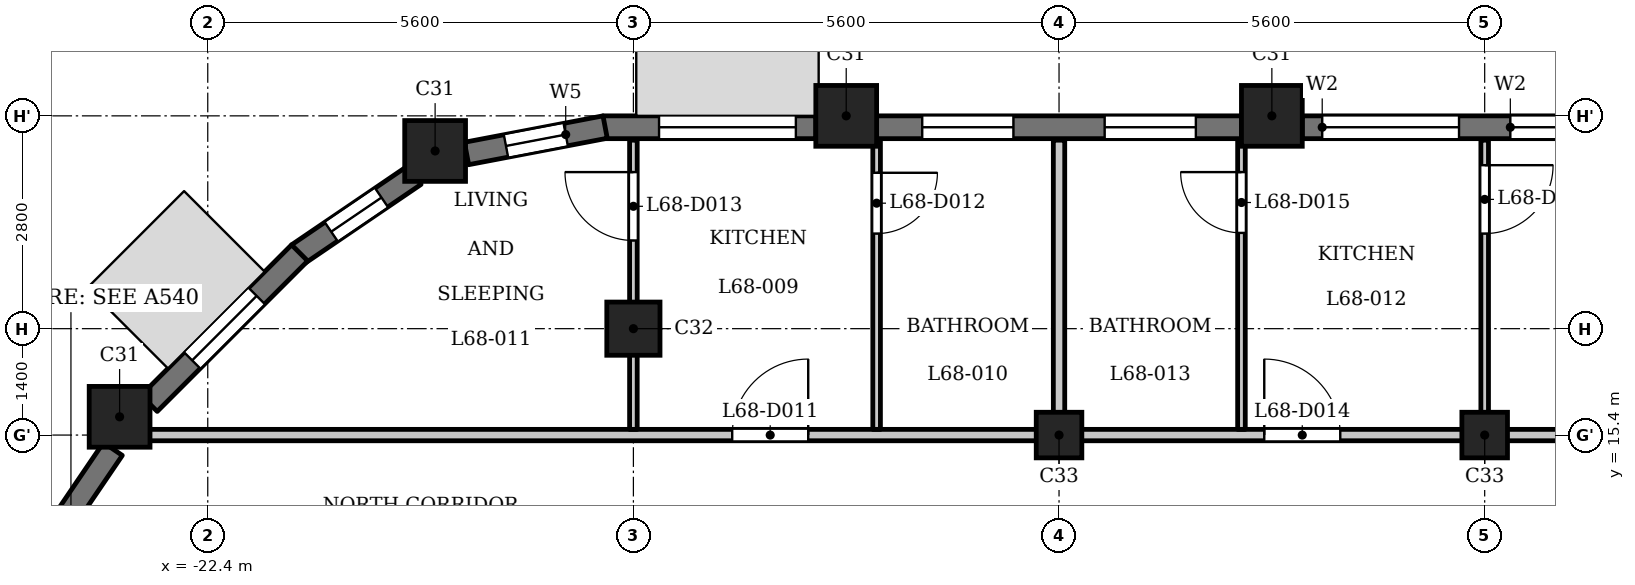
"""IFC4 building model, lengths in metres.
Left out: names, types, materials, properties, quantities, classifications, styles, units other than length and angle.
Written with IfcOpenShell. Run it as: python <this file> out.ifc"""

import sys

from ifc_helpers import new_model, si_unit, direction, frame, frame_2d, origin, origin_2d, place, context, subcontext, project, spatial, rectangle, extrude, element, fill, save


model = new_model("IFC4")
c1 = context("Model", 3, precision=1e-05, world=origin(), true_north=direction((0.0, 1.0)))
c2 = subcontext(c1, "Body", "Model", "MODEL_VIEW")
j1 = project(units=[si_unit("LENGTHUNIT", "METRE"), si_unit("PLANEANGLEUNIT", "RADIAN")], contexts=[c1])
p1 = place(None, origin())
s1 = spatial("IfcSite", under=j1, at=p1, CompositionType="ELEMENT")
p2 = place(p1, origin())
s2 = spatial("IfcBuilding", under=s1, at=p2, CompositionType="ELEMENT")
p3 = place(p2, frame((0.0, 0.0, 262.7)))
s3 = spatial("IfcBuildingStorey", under=s2, at=p3, CompositionType="ELEMENT", Elevation=262.7)
for number, where, z_axis, x_axis in (
    (1, (-8.4, 19.6, 0.0), (0.0, 0.0, 1.0), (1.0, 0.0, 0.0)),
    (2, (-14.0, 19.6, 0.0), (0.0, 0.0, 1.0), (1.0, 0.0, 0.0)),
    (3, (-19.409, 19.138, 0.0), (0.0, 0.0, 1.0), (1.0, 0.0, 0.0)),
    (4, (-23.56, 15.64, 0.0), (0.0, 0.0, 1.0), (1.0, 0.0, 0.0)),
):
    element("IfcColumn", number, at=place(p3, frame(where, z_axis=z_axis, x_axis=x_axis)), inside=s3, PredefinedType="COLUMN", context=c2, shape_type="SweptSolid", body=[
        extrude(rectangle(XDim=0.8, YDim=0.8, at=origin_2d()), origin(), (0.0, 0.0, 1.0), 3.5),
    ])
p4 = place(p3, frame((-16.8, 16.8, 0.0), z_axis=(0.0, 0.0, 1.0), x_axis=(1.0, 0.0, 0.0)))
e5 = element("IfcColumn", 5, at=p4, inside=s3, PredefinedType="COLUMN", context=c2, shape_type="SweptSolid", body=[
    extrude(rectangle(XDim=0.7, YDim=0.7, at=origin_2d()), origin(), (0.0, 0.0, 1.0), 3.5),
])
for number, where, z_axis, x_axis in (
    (6, (-11.2, 15.4, 0.0), (0.0, 0.0, 1.0), (1.0, 0.0, 0.0)),
    (7, (-5.6, 15.4, 0.0), (0.0, 0.0, 1.0), (1.0, 0.0, 0.0)),
):
    element("IfcColumn", number, at=place(p3, frame(where, z_axis=z_axis, x_axis=x_axis)), inside=s3, PredefinedType="COLUMN", context=c2, shape_type="SweptSolid", body=[
        extrude(rectangle(XDim=0.6, YDim=0.6, at=origin_2d()), origin(), (0.0, 0.0, 1.0), 3.5),
    ])
p5 = place(p3, frame((-3.2, 19.45, 0.0), z_axis=(0.0, 0.0, 1.0), x_axis=(-1.0, 0.0, 0.0)))
e8 = element("IfcWall", 8, at=p5, inside=s3, PredefinedType="SOLIDWALL", context=c2, shape_type="SweptSolid", body=[
    extrude(rectangle(XDim=4.8, YDim=0.3, at=frame_2d((2.4, 0.0))), origin(), (0.0, 0.0, 1.0), 2.55),
])
p6 = place(p5, frame((0.262, 0.0, 0.9)))
e9 = element("IfcOpeningElement", 9, at=p6, cuts=e8, PredefinedType="OPENING", context=c2, shape_type="SweptSolid", body=[
    extrude(rectangle(XDim=1.8, YDim=1.25, at=frame_2d((0.9, 0.625))), frame((0.0, 0.16, 0.0), z_axis=(0.0, -1.0, 0.0), x_axis=(1.0, 0.0, 0.0)), (0.0, 0.0, 1.0), 0.32),
])
p7 = place(p5, frame((2.738, 0.0, 0.9)))
e10 = element("IfcOpeningElement", 10, at=p7, cuts=e8, PredefinedType="OPENING", context=c2, shape_type="SweptSolid", body=[
    extrude(rectangle(XDim=1.8, YDim=1.25, at=frame_2d((0.9, 0.625))), frame((0.0, 0.16, 0.0), z_axis=(0.0, -1.0, 0.0), x_axis=(1.0, 0.0, 0.0)), (0.0, 0.0, 1.0), 0.32),
])
p8 = place(p3, frame((-8.8, 19.45, 0.0), z_axis=(0.0, 0.0, 1.0), x_axis=(-1.0, 0.0, 0.0)))
e11 = element("IfcWall", 11, at=p8, inside=s3, PredefinedType="SOLIDWALL", context=c2, shape_type="SweptSolid", body=[
    extrude(rectangle(XDim=4.8, YDim=0.3, at=frame_2d((2.4, 0.0))), origin(), (0.0, 0.0, 1.0), 2.55),
])
p9 = place(p8, frame((0.6, 0.0, 0.6)))
e12 = element("IfcOpeningElement", 12, at=p9, cuts=e11, PredefinedType="OPENING", context=c2, shape_type="SweptSolid", body=[
    extrude(rectangle(XDim=1.2, YDim=1.55, at=frame_2d((0.6, 0.775))), frame((0.0, 0.16, 0.0), z_axis=(0.0, -1.0, 0.0), x_axis=(1.0, 0.0, 0.0)), (0.0, 0.0, 1.0), 0.32),
])
p10 = place(p8, frame((3.0, 0.0, 0.6)))
e13 = element("IfcOpeningElement", 13, at=p10, cuts=e11, PredefinedType="OPENING", context=c2, shape_type="SweptSolid", body=[
    extrude(rectangle(XDim=1.2, YDim=1.55, at=frame_2d((0.6, 0.775))), frame((0.0, 0.16, 0.0), z_axis=(0.0, -1.0, 0.0), x_axis=(1.0, 0.0, 0.0)), (0.0, 0.0, 1.0), 0.32),
])
p11 = place(p3, frame((-14.4, 19.45, 0.0), z_axis=(0.0, 0.0, 1.0), x_axis=(-1.0, 0.0, 0.0)))
e14 = element("IfcWall", 14, at=p11, inside=s3, PredefinedType="SOLIDWALL", context=c2, shape_type="SweptSolid", body=[
    extrude(rectangle(XDim=2.8, YDim=0.3, at=frame_2d((1.4, 0.0))), origin(), (0.0, 0.0, 1.0), 2.55),
])
p12 = place(p11, frame((0.262, 0.0, 0.9)))
e15 = element("IfcOpeningElement", 15, at=p12, cuts=e14, PredefinedType="OPENING", context=c2, shape_type="SweptSolid", body=[
    extrude(rectangle(XDim=1.8, YDim=1.25, at=frame_2d((0.9, 0.625))), frame((0.0, 0.16, 0.0), z_axis=(0.0, -1.0, 0.0), x_axis=(1.0, 0.0, 0.0)), (0.0, 0.0, 1.0), 0.32),
])
p13 = place(p3, frame((-17.172, 19.453, 0.0), z_axis=(0.0, 0.0, 1.0), x_axis=(-0.982301706131, -0.187305520826, 0.0)))
e16 = element("IfcWall", 16, at=p13, inside=s3, PredefinedType="SOLIDWALL", context=c2, shape_type="SweptSolid", body=[
    extrude(rectangle(XDim=1.856, YDim=0.3, at=frame_2d((0.928, 0.0))), origin(), (0.0, 0.0, 1.0), 2.55),
])
p14 = place(p13, frame((0.528, 0.0, 0.6)))
e17 = element("IfcOpeningElement", 17, at=p14, cuts=e16, PredefinedType="OPENING", context=c2, shape_type="SweptSolid", body=[
    extrude(rectangle(XDim=0.8, YDim=1.55, at=frame_2d((0.4, 0.775))), frame((0.0, 0.16, 0.0), z_axis=(0.0, -1.0, 0.0), x_axis=(1.0, 0.0, 0.0)), (0.0, 0.0, 1.0), 0.32),
])
p15 = place(p3, frame((-19.678, 18.822, 0.0), z_axis=(0.0, 0.0, 1.0), x_axis=(-0.826997446962, -0.562205676526, 0.0)))
e18 = element("IfcWall", 18, at=p15, inside=s3, PredefinedType="SOLIDWALL", context=c2, shape_type="SweptSolid", body=[
    extrude(rectangle(XDim=1.856, YDim=0.3, at=frame_2d((0.928, 0.0))), origin(), (0.0, 0.0, 1.0), 2.55),
])
p16 = place(p15, frame((0.528, 0.0, 0.6)))
e19 = element("IfcOpeningElement", 19, at=p16, cuts=e18, PredefinedType="OPENING", context=c2, shape_type="SweptSolid", body=[
    extrude(rectangle(XDim=0.8, YDim=1.55, at=frame_2d((0.4, 0.775))), frame((0.0, 0.16, 0.0), z_axis=(0.0, -1.0, 0.0), x_axis=(1.0, 0.0, 0.0)), (0.0, 0.0, 1.0), 0.32),
])
p17 = place(p3, frame((-21.191, 17.797, 0.0), z_axis=(0.0, 0.0, 1.0), x_axis=(-0.707106781187, -0.707106781187, 0.0)))
e20 = element("IfcWall", 20, at=p17, inside=s3, PredefinedType="SOLIDWALL", context=c2, shape_type="SweptSolid", body=[
    extrude(rectangle(XDim=2.8, YDim=0.3, at=frame_2d((1.4, 0.0))), origin(), (0.0, 0.0, 1.0), 2.55),
])
p18 = place(p17, frame((0.8, 0.0, 0.6)))
e21 = element("IfcOpeningElement", 21, at=p18, cuts=e20, PredefinedType="OPENING", context=c2, shape_type="SweptSolid", body=[
    extrude(rectangle(XDim=1.2, YDim=1.55, at=frame_2d((0.6, 0.775))), frame((0.0, 0.16, 0.0), z_axis=(0.0, -1.0, 0.0), x_axis=(1.0, 0.0, 0.0)), (0.0, 0.0, 1.0), 0.32),
])
p19 = place(p3, frame((-23.648, 15.217, 0.0), z_axis=(0.0, 0.0, 1.0), x_axis=(-0.562043265151, -0.827107833416, 0.0)))
e22 = element("IfcWall", 22, at=p19, inside=s3, PredefinedType="SOLIDWALL", context=c2, shape_type="SweptSolid", body=[
    extrude(rectangle(XDim=1.377, YDim=0.3, at=frame_2d((0.688, 0.0))), origin(), (0.0, 0.0, 1.0), 2.55),
])
p20 = place(p3, frame((-23.55, 15.4, 0.0), z_axis=(0.0, 0.0, 1.0), x_axis=(1.0, 0.0, 0.0)))
e23 = element("IfcWall", 23, at=p20, inside=s3, PredefinedType="PARTITIONING", context=c2, shape_type="SweptSolid", body=[
    extrude(rectangle(XDim=46.872, YDim=0.15, at=frame_2d((23.436, 0.0))), origin(), (0.0, 0.0, 1.0), 3.2),
])
p21 = place(p20, frame((8.05, 0.0, 0.0)))
e24 = element("IfcOpeningElement", 24, at=p21, cuts=e23, PredefinedType="OPENING", context=c2, shape_type="SweptSolid", body=[
    extrude(rectangle(XDim=1.0, YDim=2.1, at=frame_2d((0.5, 1.05))), frame((0.0, 0.085, 0.0), z_axis=(0.0, -1.0, 0.0), x_axis=(1.0, 0.0, 0.0)), (0.0, 0.0, 1.0), 0.17),
])
p22 = place(p20, frame((15.05, 0.0, 0.0)))
e25 = element("IfcOpeningElement", 25, at=p22, cuts=e23, PredefinedType="OPENING", context=c2, shape_type="SweptSolid", body=[
    extrude(rectangle(XDim=1.0, YDim=2.1, at=frame_2d((0.5, 1.05))), frame((0.0, 0.085, 0.0), z_axis=(0.0, -1.0, 0.0), x_axis=(1.0, 0.0, 0.0)), (0.0, 0.0, 1.0), 0.17),
])
p23 = place(p20, frame((26.25, 0.0, 0.0)))
e26 = element("IfcOpeningElement", 26, at=p23, cuts=e23, PredefinedType="OPENING", context=c2, shape_type="SweptSolid", body=[
    extrude(rectangle(XDim=1.0, YDim=2.1, at=frame_2d((0.5, 1.05))), frame((0.0, 0.085, 0.0), z_axis=(0.0, -1.0, 0.0), x_axis=(1.0, 0.0, 0.0)), (0.0, 0.0, 1.0), 0.17),
])
p24 = place(p20, frame((38.2, 0.0, 0.0)))
e27 = element("IfcOpeningElement", 27, at=p24, cuts=e23, PredefinedType="OPENING", context=c2, shape_type="SweptSolid", body=[
    extrude(rectangle(XDim=1.0, YDim=2.1, at=frame_2d((0.5, 1.05))), frame((0.0, 0.085, 0.0), z_axis=(0.0, -1.0, 0.0), x_axis=(1.0, 0.0, 0.0)), (0.0, 0.0, 1.0), 0.17),
])
p25 = place(p3, frame((-16.8, 15.475, 0.0), z_axis=(0.0, 0.0, 1.0), x_axis=(0.0, 1.0, 0.0)))
e28 = element("IfcWall", 28, at=p25, inside=s3, PredefinedType="PARTITIONING", context=c2, shape_type="SweptSolid", body=[
    extrude(rectangle(XDim=3.805, YDim=0.1, at=frame_2d((1.902, 0.0))), origin(), (0.0, 0.0, 1.0), 3.2),
])
p26 = place(p25, frame((2.485, 0.0, 0.0)))
e29 = element("IfcOpeningElement", 29, at=p26, cuts=e28, PredefinedType="OPENING", context=c2, shape_type="SweptSolid", body=[
    extrude(rectangle(XDim=0.9, YDim=2.1, at=frame_2d((0.45, 1.05))), frame((0.0, 0.06, 0.0), z_axis=(0.0, -1.0, 0.0), x_axis=(1.0, 0.0, 0.0)), (0.0, 0.0, 1.0), 0.12),
])
p27 = place(p3, frame((-13.6, 15.475, 0.0), z_axis=(0.0, 0.0, 1.0), x_axis=(0.0, 1.0, 0.0)))
e30 = element("IfcWall", 30, at=p27, inside=s3, PredefinedType="PARTITIONING", context=c2, shape_type="SweptSolid", body=[
    extrude(rectangle(XDim=3.805, YDim=0.1, at=frame_2d((1.902, 0.0))), origin(), (0.0, 0.0, 1.0), 3.2),
])
p28 = place(p27, frame((2.576, 0.0, 0.0)))
e31 = element("IfcOpeningElement", 31, at=p28, cuts=e30, PredefinedType="OPENING", context=c2, shape_type="SweptSolid", body=[
    extrude(rectangle(XDim=0.8, YDim=2.1, at=frame_2d((0.4, 1.05))), frame((0.0, 0.06, 0.0), z_axis=(0.0, -1.0, 0.0), x_axis=(1.0, 0.0, 0.0)), (0.0, 0.0, 1.0), 0.12),
])
p29 = place(p3, frame((-11.2, 15.475, 0.0), z_axis=(0.0, 0.0, 1.0), x_axis=(0.0, 1.0, 0.0)))
e32 = element("IfcWall", 32, at=p29, inside=s3, PredefinedType="PARTITIONING", context=c2, shape_type="SweptSolid", body=[
    extrude(rectangle(XDim=3.805, YDim=0.15, at=frame_2d((1.902, 0.0))), origin(), (0.0, 0.0, 1.0), 3.2),
])
p30 = place(p3, frame((-8.8, 15.475, 0.0), z_axis=(0.0, 0.0, 1.0), x_axis=(0.0, 1.0, 0.0)))
e33 = element("IfcWall", 33, at=p30, inside=s3, PredefinedType="PARTITIONING", context=c2, shape_type="SweptSolid", body=[
    extrude(rectangle(XDim=3.805, YDim=0.1, at=frame_2d((1.902, 0.0))), origin(), (0.0, 0.0, 1.0), 3.2),
])
p31 = place(p30, frame((2.585, 0.0, 0.0)))
e34 = element("IfcOpeningElement", 34, at=p31, cuts=e33, PredefinedType="OPENING", context=c2, shape_type="SweptSolid", body=[
    extrude(rectangle(XDim=0.8, YDim=2.1, at=frame_2d((0.4, 1.05))), frame((0.0, 0.06, 0.0), z_axis=(0.0, -1.0, 0.0), x_axis=(1.0, 0.0, 0.0)), (0.0, 0.0, 1.0), 0.12),
])
p32 = place(p3, frame((-5.6, 15.475, 0.0), z_axis=(0.0, 0.0, 1.0), x_axis=(0.0, 1.0, 0.0)))
e35 = element("IfcWall", 35, at=p32, inside=s3, PredefinedType="PARTITIONING", context=c2, shape_type="SweptSolid", body=[
    extrude(rectangle(XDim=3.805, YDim=0.1, at=frame_2d((1.902, 0.0))), origin(), (0.0, 0.0, 1.0), 3.2),
])
p33 = place(p32, frame((2.576, 0.0, 0.0)))
e36 = element("IfcOpeningElement", 36, at=p33, cuts=e35, PredefinedType="OPENING", context=c2, shape_type="SweptSolid", body=[
    extrude(rectangle(XDim=0.9, YDim=2.1, at=frame_2d((0.45, 1.05))), frame((0.0, 0.06, 0.0), z_axis=(0.0, -1.0, 0.0), x_axis=(1.0, 0.0, 0.0)), (0.0, 0.0, 1.0), 0.12),
])
p34 = place(p21, origin())
e37 = element("IfcDoor", 37, at=p34, inside=s3, OperationType="SINGLE_SWING_LEFT", PredefinedType="DOOR", context=c2, shape_type="SweptSolid", body=[
    extrude(rectangle(XDim=1.0, YDim=2.1, at=frame_2d((0.5, 1.05))), frame((0.0, 0.025, 0.0), z_axis=(0.0, -1.0, 0.0), x_axis=(1.0, 0.0, 0.0)), (0.0, 0.0, 1.0), 0.05),
])
fill(e24, e37)
p35 = place(p28, origin())
e38 = element("IfcDoor", 38, at=p35, inside=s3, OperationType="SINGLE_SWING_RIGHT", PredefinedType="DOOR", context=c2, shape_type="SweptSolid", body=[
    extrude(rectangle(XDim=0.8, YDim=2.1, at=frame_2d((0.4, 1.05))), frame((0.0, 0.025, 0.0), z_axis=(0.0, -1.0, 0.0), x_axis=(1.0, 0.0, 0.0)), (0.0, 0.0, 1.0), 0.05),
])
fill(e31, e38)
p36 = place(p26, origin())
e39 = element("IfcDoor", 39, at=p36, inside=s3, OperationType="SINGLE_SWING_LEFT", PredefinedType="DOOR", context=c2, shape_type="SweptSolid", body=[
    extrude(rectangle(XDim=0.9, YDim=2.1, at=frame_2d((0.45, 1.05))), frame((0.0, 0.025, 0.0), z_axis=(0.0, -1.0, 0.0), x_axis=(1.0, 0.0, 0.0)), (0.0, 0.0, 1.0), 0.05),
])
fill(e29, e39)
p37 = place(p22, origin())
e40 = element("IfcDoor", 40, at=p37, inside=s3, OperationType="SINGLE_SWING_RIGHT", PredefinedType="DOOR", context=c2, shape_type="SweptSolid", body=[
    extrude(rectangle(XDim=1.0, YDim=2.1, at=frame_2d((0.5, 1.05))), frame((0.0, 0.025, 0.0), z_axis=(0.0, -1.0, 0.0), x_axis=(1.0, 0.0, 0.0)), (0.0, 0.0, 1.0), 0.05),
])
fill(e25, e40)
p38 = place(p31, origin())
e41 = element("IfcDoor", 41, at=p38, inside=s3, OperationType="SINGLE_SWING_LEFT", PredefinedType="DOOR", context=c2, shape_type="SweptSolid", body=[
    extrude(rectangle(XDim=0.8, YDim=2.1, at=frame_2d((0.4, 1.05))), frame((0.0, 0.025, 0.0), z_axis=(0.0, -1.0, 0.0), x_axis=(1.0, 0.0, 0.0)), (0.0, 0.0, 1.0), 0.05),
])
fill(e34, e41)
p39 = place(p33, origin())
e42 = element("IfcDoor", 42, at=p39, inside=s3, OperationType="SINGLE_SWING_RIGHT", PredefinedType="DOOR", context=c2, shape_type="SweptSolid", body=[
    extrude(rectangle(XDim=0.9, YDim=2.1, at=frame_2d((0.45, 1.05))), frame((0.0, 0.025, 0.0), z_axis=(0.0, -1.0, 0.0), x_axis=(1.0, 0.0, 0.0)), (0.0, 0.0, 1.0), 0.05),
])
fill(e36, e42)
p40 = place(p6, origin())
e43 = element("IfcWindow", 43, at=p40, inside=s3, PartitioningType="SINGLE_PANEL", PredefinedType="WINDOW", context=c2, shape_type="SweptSolid", body=[
    extrude(rectangle(XDim=1.8, YDim=1.25, at=frame_2d((0.9, 0.625))), frame((0.0, 0.03, 0.0), z_axis=(0.0, -1.0, 0.0), x_axis=(1.0, 0.0, 0.0)), (0.0, 0.0, 1.0), 0.06),
])
fill(e9, e43)
p41 = place(p7, origin())
e44 = element("IfcWindow", 44, at=p41, inside=s3, PartitioningType="SINGLE_PANEL", PredefinedType="WINDOW", context=c2, shape_type="SweptSolid", body=[
    extrude(rectangle(XDim=1.8, YDim=1.25, at=frame_2d((0.9, 0.625))), frame((0.0, 0.03, 0.0), z_axis=(0.0, -1.0, 0.0), x_axis=(1.0, 0.0, 0.0)), (0.0, 0.0, 1.0), 0.06),
])
fill(e10, e44)
p42 = place(p9, origin())
e45 = element("IfcWindow", 45, at=p42, inside=s3, PartitioningType="SINGLE_PANEL", PredefinedType="WINDOW", context=c2, shape_type="SweptSolid", body=[
    extrude(rectangle(XDim=1.2, YDim=1.55, at=frame_2d((0.6, 0.775))), frame((0.0, 0.03, 0.0), z_axis=(0.0, -1.0, 0.0), x_axis=(1.0, 0.0, 0.0)), (0.0, 0.0, 1.0), 0.06),
])
fill(e12, e45)
p43 = place(p10, origin())
e46 = element("IfcWindow", 46, at=p43, inside=s3, PartitioningType="SINGLE_PANEL", PredefinedType="WINDOW", context=c2, shape_type="SweptSolid", body=[
    extrude(rectangle(XDim=1.2, YDim=1.55, at=frame_2d((0.6, 0.775))), frame((0.0, 0.03, 0.0), z_axis=(0.0, -1.0, 0.0), x_axis=(1.0, 0.0, 0.0)), (0.0, 0.0, 1.0), 0.06),
])
fill(e13, e46)
p44 = place(p12, origin())
e47 = element("IfcWindow", 47, at=p44, inside=s3, PartitioningType="SINGLE_PANEL", PredefinedType="WINDOW", context=c2, shape_type="SweptSolid", body=[
    extrude(rectangle(XDim=1.8, YDim=1.25, at=frame_2d((0.9, 0.625))), frame((0.0, 0.03, 0.0), z_axis=(0.0, -1.0, 0.0), x_axis=(1.0, 0.0, 0.0)), (0.0, 0.0, 1.0), 0.06),
])
fill(e15, e47)
p45 = place(p14, origin())
e48 = element("IfcWindow", 48, at=p45, inside=s3, PartitioningType="SINGLE_PANEL", PredefinedType="WINDOW", context=c2, shape_type="SweptSolid", body=[
    extrude(rectangle(XDim=0.8, YDim=1.55, at=frame_2d((0.4, 0.775))), frame((0.0, 0.03, 0.0), z_axis=(0.0, -1.0, 0.0), x_axis=(1.0, 0.0, 0.0)), (0.0, 0.0, 1.0), 0.06),
])
fill(e17, e48)
p46 = place(p16, origin())
e49 = element("IfcWindow", 49, at=p46, inside=s3, PartitioningType="SINGLE_PANEL", PredefinedType="WINDOW", context=c2, shape_type="SweptSolid", body=[
    extrude(rectangle(XDim=0.8, YDim=1.55, at=frame_2d((0.4, 0.775))), frame((0.0, 0.03, 0.0), z_axis=(0.0, -1.0, 0.0), x_axis=(1.0, 0.0, 0.0)), (0.0, 0.0, 1.0), 0.06),
])
fill(e19, e49)
p47 = place(p18, origin())
e50 = element("IfcWindow", 50, at=p47, inside=s3, PartitioningType="SINGLE_PANEL", PredefinedType="WINDOW", context=c2, shape_type="SweptSolid", body=[
    extrude(rectangle(XDim=1.2, YDim=1.55, at=frame_2d((0.6, 0.775))), frame((0.0, 0.03, 0.0), z_axis=(0.0, -1.0, 0.0), x_axis=(1.0, 0.0, 0.0)), (0.0, 0.0, 1.0), 0.06),
])
fill(e21, e50)
save(model, sys.argv[1])
